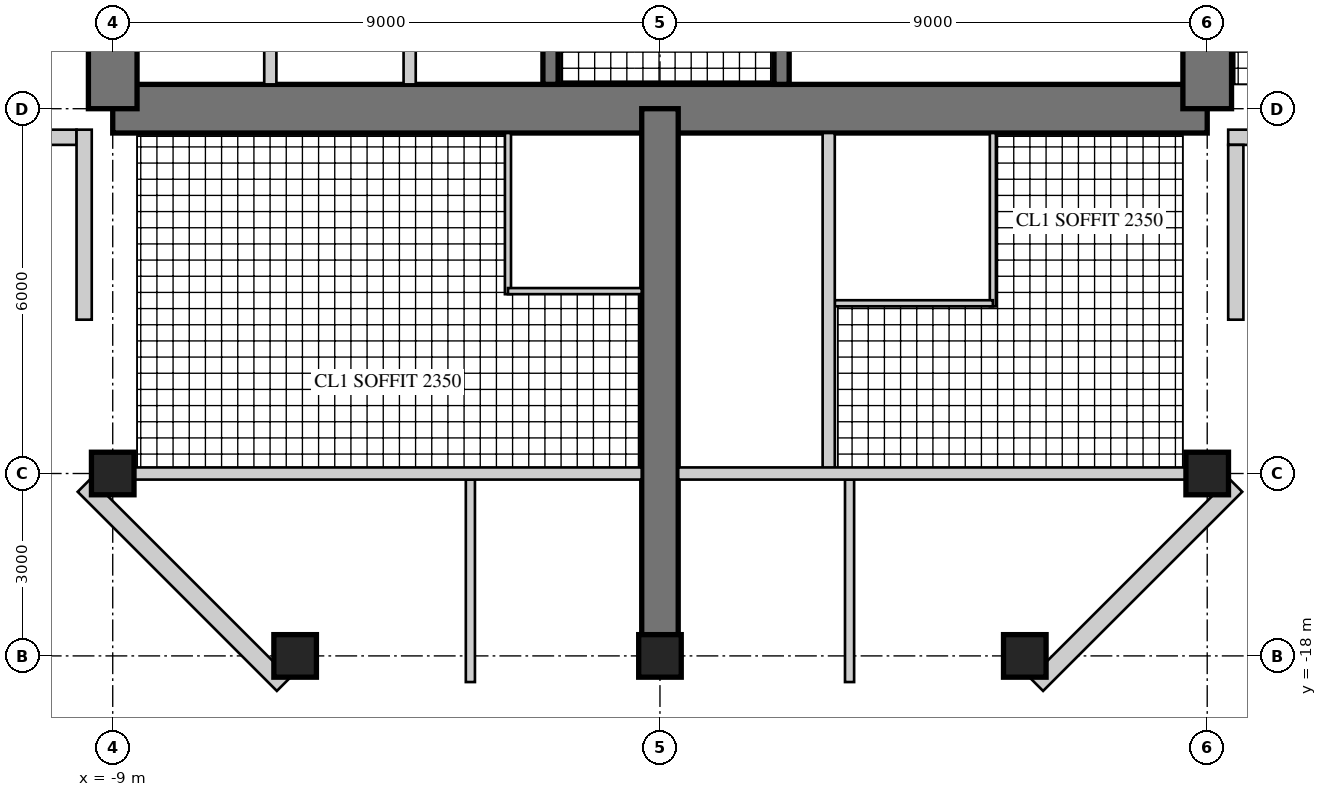
"""IFC4 building model, lengths in metres.
Left out: names, types, materials, properties, quantities, classifications, styles, units other than length and angle.
Written with IfcOpenShell. Run it as: python <this file> out.ifc"""

import sys

from ifc_helpers import new_model, si_unit, direction, frame, frame_2d, origin, origin_2d, place, context, subcontext, project, spatial, rectangle, hollow_rectangle, extrude, element, fill, save


model = new_model("IFC4")
c1 = context("Model", 3, precision=1e-05, world=origin(), true_north=direction((0.0, 1.0)))
c2 = subcontext(c1, "Body", "Model", "MODEL_VIEW")
j1 = project(units=[si_unit("LENGTHUNIT", "METRE"), si_unit("PLANEANGLEUNIT", "RADIAN")], contexts=[c1])
p1 = place(None, origin())
s1 = spatial("IfcSite", under=j1, at=p1, CompositionType="ELEMENT")
p2 = place(p1, origin())
s2 = spatial("IfcBuilding", under=s1, at=p2, CompositionType="ELEMENT")
p3 = place(p2, frame((0.0, 0.0, 278.1)))
s3 = spatial("IfcBuildingStorey", under=s2, at=p3, CompositionType="ELEMENT", Elevation=278.1)
p4 = place(p3, frame((-9.0, -9.0, 0.0), z_axis=(0.0, 0.0, 1.0), x_axis=(1.0, 0.0, 0.0)))
e1 = element("IfcWall", 1, at=p4, inside=s3, PredefinedType="SHEAR", context=c2, shape_type="SweptSolid", body=[
    extrude(rectangle(XDim=18.0, YDim=0.8, at=frame_2d((9.0, 0.0))), origin(), (0.0, 0.0, 1.0), 3.4),
])
p5 = place(p4, frame((9.8, 0.0, 0.0)))
e2 = element("IfcOpeningElement", 2, at=p5, cuts=e1, PredefinedType="OPENING", context=c2, shape_type="SweptSolid", body=[
    extrude(rectangle(XDim=1.0, YDim=2.4, at=frame_2d((0.5, 1.2))), frame((0.0, 0.41, 0.0), z_axis=(0.0, -1.0, 0.0), x_axis=(1.0, 0.0, 0.0)), (0.0, 0.0, 1.0), 0.82),
])
p6 = place(p3, frame((9.0, -9.0, 0.0), z_axis=(0.0, 0.0, 1.0), x_axis=(0.0, 1.0, 0.0)))
e3 = element("IfcWall", 3, at=p6, inside=s3, PredefinedType="SHEAR", context=c2, shape_type="SweptSolid", body=[
    extrude(rectangle(XDim=18.0, YDim=0.8, at=frame_2d((9.0, 0.0))), origin(), (0.0, 0.0, 1.0), 3.4),
])
p7 = place(p6, frame((9.8, 0.0, 0.0)))
e4 = element("IfcOpeningElement", 4, at=p7, cuts=e3, PredefinedType="OPENING", context=c2, shape_type="SweptSolid", body=[
    extrude(rectangle(XDim=1.0, YDim=2.4, at=frame_2d((0.5, 1.2))), frame((0.0, 0.41, 0.0), z_axis=(0.0, -1.0, 0.0), x_axis=(1.0, 0.0, 0.0)), (0.0, 0.0, 1.0), 0.82),
])
p8 = place(p3, frame((-9.0, 9.0, 0.0), z_axis=(0.0, 0.0, 1.0), x_axis=(0.0, -1.0, 0.0)))
e5 = element("IfcWall", 5, at=p8, inside=s3, PredefinedType="SHEAR", context=c2, shape_type="SweptSolid", body=[
    extrude(rectangle(XDim=18.0, YDim=0.8, at=frame_2d((9.0, 0.0))), origin(), (0.0, 0.0, 1.0), 3.4),
])
p9 = place(p8, frame((9.8, 0.0, 0.0)))
e6 = element("IfcOpeningElement", 6, at=p9, cuts=e5, PredefinedType="OPENING", context=c2, shape_type="SweptSolid", body=[
    extrude(rectangle(XDim=1.0, YDim=2.4, at=frame_2d((0.5, 1.2))), frame((0.0, 0.41, 0.0), z_axis=(0.0, -1.0, 0.0), x_axis=(1.0, 0.0, 0.0)), (0.0, 0.0, 1.0), 0.82),
])
p10 = place(p3, frame((-1.8, -1.875, 0.0), z_axis=(0.0, 0.0, 1.0), x_axis=(0.0, -1.0, 0.0)))
e7 = element("IfcWall", 7, at=p10, inside=s3, PredefinedType="SHEAR", context=c2, shape_type="SweptSolid", body=[
    extrude(rectangle(XDim=6.725, YDim=0.25, at=frame_2d((3.363, 0.0))), origin(), (0.0, 0.0, 1.0), 3.4),
])
p11 = place(p10, frame((1.875, 0.0, 0.0)))
e8 = element("IfcOpeningElement", 8, at=p11, cuts=e7, PredefinedType="OPENING", context=c2, shape_type="SweptSolid", body=[
    extrude(rectangle(XDim=1.6, YDim=2.4, at=frame_2d((0.8, 1.2))), frame((0.0, 0.135, 0.0), z_axis=(0.0, -1.0, 0.0), x_axis=(1.0, 0.0, 0.0)), (0.0, 0.0, 1.0), 0.27),
])
for number, where, z_axis, x_axis in (
    (9, (-4.117, -5.975, 0.0), (0.0, 0.0, 1.0), (0.0, -1.0, 0.0)),
    (10, (-6.408, -5.975, 0.0), (0.0, 0.0, 1.0), (0.0, -1.0, 0.0)),
):
    element("IfcWall", number, at=place(p3, frame(where, z_axis=z_axis, x_axis=x_axis)), inside=s3, PredefinedType="PARTITIONING", context=c2, shape_type="SweptSolid", body=[
        extrude(rectangle(XDim=2.625, YDim=0.2, at=frame_2d((1.312, 0.0))), origin(), (0.0, 0.0, 1.0), 3.4),
    ])
p12 = place(p3, frame((2.0, -1.675, 0.0), z_axis=(0.0, 0.0, 1.0), x_axis=(0.0, -1.0, 0.0)))
e11 = element("IfcWall", 11, at=p12, inside=s3, PredefinedType="SHEAR", context=c2, shape_type="SweptSolid", body=[
    extrude(rectangle(XDim=6.925, YDim=0.25, at=frame_2d((3.462, 0.0))), origin(), (0.0, 0.0, 1.0), 3.4),
])
p13 = place(p12, frame((0.725, 0.0, 0.0)))
e12 = element("IfcOpeningElement", 12, at=p13, cuts=e11, PredefinedType="OPENING", context=c2, shape_type="SweptSolid", body=[
    extrude(rectangle(XDim=1.0, YDim=2.1, at=frame_2d((0.5, 1.05))), frame((0.0, 0.135, 0.0), z_axis=(0.0, -1.0, 0.0), x_axis=(1.0, 0.0, 0.0)), (0.0, 0.0, 1.0), 0.27),
])
p14 = place(p3, frame((0.0, -9.0, 0.0), z_axis=(0.0, 0.0, 1.0), x_axis=(0.0, -1.0, 0.0)))
e13 = element("IfcWall", 13, at=p14, inside=s3, PredefinedType="SHEAR", context=c2, shape_type="SweptSolid", body=[
    extrude(rectangle(XDim=9.0, YDim=0.6, at=frame_2d((4.5, 0.0))), origin(), (0.0, 0.0, 1.0), 3.4),
])
p15 = place(p14, frame((3.8, 0.0, 0.0)))
e14 = element("IfcOpeningElement", 14, at=p15, cuts=e13, PredefinedType="OPENING", context=c2, shape_type="SweptSolid", body=[
    extrude(rectangle(XDim=1.0, YDim=2.15, at=frame_2d((0.5, 1.075))), frame((0.0, 0.31, 0.0), z_axis=(0.0, -1.0, 0.0), x_axis=(1.0, 0.0, 0.0)), (0.0, 0.0, 1.0), 0.62),
])
p16 = place(p14, frame((7.0, 0.0, 0.0)))
e15 = element("IfcOpeningElement", 15, at=p16, cuts=e13, PredefinedType="OPENING", context=c2, shape_type="SweptSolid", body=[
    extrude(rectangle(XDim=1.0, YDim=2.2, at=frame_2d((0.5, 1.1))), frame((0.0, 0.31, 0.0), z_axis=(0.0, -1.0, 0.0), x_axis=(1.0, 0.0, 0.0)), (0.0, 0.0, 1.0), 0.62),
])
for number, where, z_axis, x_axis in (
    (16, (-9.0, -15.0, 0.0), (0.0, 0.0, 1.0), (1.0, 0.0, 0.0)),
    (17, (9.0, -15.0, 0.0), (0.0, 0.0, 1.0), (1.0, 0.0, 0.0)),
    (18, (-6.0, -18.0, 0.0), (0.0, 0.0, 1.0), (1.0, 0.0, 0.0)),
    (19, (0.0, -18.0, 0.0), (0.0, 0.0, 1.0), (1.0, 0.0, 0.0)),
    (20, (6.0, -18.0, 0.0), (0.0, 0.0, 1.0), (1.0, 0.0, 0.0)),
):
    element("IfcColumn", number, at=place(p3, frame(where, z_axis=z_axis, x_axis=x_axis)), inside=s3, PredefinedType="COLUMN", context=c2, shape_type="SweptSolid", body=[
        extrude(rectangle(XDim=0.7, YDim=0.7, at=origin_2d()), origin(), (0.0, 0.0, 1.0), 3.4),
    ])
p17 = place(p3, frame((9.345, -9.47, 0.0), z_axis=(0.0, 0.0, 1.0), x_axis=(1.0, 0.0, 0.0)))
e21 = element("IfcWall", 21, at=p17, inside=s3, PredefinedType="SOLIDWALL", context=c2, shape_type="SweptSolid", body=[
    extrude(rectangle(XDim=3.125, YDim=0.25, at=frame_2d((1.562, 0.0))), origin(), (0.0, 0.0, 1.0), 3.22),
])
p18 = place(p17, frame((0.6, 0.0, 0.0)))
e22 = element("IfcOpeningElement", 22, at=p18, cuts=e21, PredefinedType="OPENING", context=c2, shape_type="SweptSolid", body=[
    extrude(rectangle(XDim=1.0, YDim=2.2, at=frame_2d((0.5, 1.1))), frame((0.0, 0.135, 0.0), z_axis=(0.0, -1.0, 0.0), x_axis=(1.0, 0.0, 0.0)), (0.0, 0.0, 1.0), 0.27),
])
p19 = place(p3, frame((-12.47, -9.47, 0.0), z_axis=(0.0, 0.0, 1.0), x_axis=(1.0, 0.0, 0.0)))
e23 = element("IfcWall", 23, at=p19, inside=s3, PredefinedType="SOLIDWALL", context=c2, shape_type="SweptSolid", body=[
    extrude(rectangle(XDim=2.875, YDim=0.25, at=frame_2d((1.438, 0.0))), origin(), (0.0, 0.0, 1.0), 3.22),
])
p20 = place(p19, frame((0.6, 0.0, 0.0)))
e24 = element("IfcOpeningElement", 24, at=p20, cuts=e23, PredefinedType="OPENING", context=c2, shape_type="SweptSolid", body=[
    extrude(rectangle(XDim=1.0, YDim=2.2, at=frame_2d((0.5, 1.1))), frame((0.0, 0.135, 0.0), z_axis=(0.0, -1.0, 0.0), x_axis=(1.0, 0.0, 0.0)), (0.0, 0.0, 1.0), 0.27),
])
p21 = place(p3, frame((-9.47, -9.345, 0.0), z_axis=(0.0, 0.0, 1.0), x_axis=(0.0, -1.0, 0.0)))
e25 = element("IfcWall", 25, at=p21, inside=s3, PredefinedType="SOLIDWALL", context=c2, shape_type="SweptSolid", body=[
    extrude(rectangle(XDim=3.125, YDim=0.25, at=frame_2d((1.562, 0.0))), origin(), (0.0, 0.0, 1.0), 3.22),
])
p22 = place(p21, frame((0.6, 0.0, 0.0)))
e26 = element("IfcOpeningElement", 26, at=p22, cuts=e25, PredefinedType="OPENING", context=c2, shape_type="SweptSolid", body=[
    extrude(rectangle(XDim=1.0, YDim=2.2, at=frame_2d((0.5, 1.1))), frame((0.0, 0.135, 0.0), z_axis=(0.0, -1.0, 0.0), x_axis=(1.0, 0.0, 0.0)), (0.0, 0.0, 1.0), 0.27),
])
p23 = place(p3, frame((-9.47, -15.195, 0.0), z_axis=(0.0, 0.0, 1.0), x_axis=(0.707106781187, -0.707106781187, 0.0)))
e27 = element("IfcWall", 27, at=p23, inside=s3, PredefinedType="SOLIDWALL", context=c2, shape_type="SweptSolid", body=[
    extrude(rectangle(XDim=4.632, YDim=0.3, at=frame_2d((2.316, 0.0))), origin(), (0.0, 0.0, 1.0), 3.22),
])
p24 = place(p23, frame((1.866, 0.0, 0.3)))
e28 = element("IfcOpeningElement", 28, at=p24, cuts=e27, PredefinedType="OPENING", context=c2, shape_type="SweptSolid", body=[
    extrude(rectangle(XDim=0.9, YDim=2.4, at=frame_2d((0.45, 1.2))), frame((0.0, 0.16, 0.0), z_axis=(0.0, -1.0, 0.0), x_axis=(1.0, 0.0, 0.0)), (0.0, 0.0, 1.0), 0.32),
])
p25 = place(p3, frame((6.195, -18.47, 0.0), z_axis=(0.0, 0.0, 1.0), x_axis=(0.707106781187, 0.707106781187, 0.0)))
e29 = element("IfcWall", 29, at=p25, inside=s3, PredefinedType="SOLIDWALL", context=c2, shape_type="SweptSolid", body=[
    extrude(rectangle(XDim=4.632, YDim=0.3, at=frame_2d((2.316, 0.0))), origin(), (0.0, 0.0, 1.0), 3.22),
])
p26 = place(p25, frame((1.866, 0.0, 0.3)))
e30 = element("IfcOpeningElement", 30, at=p26, cuts=e29, PredefinedType="OPENING", context=c2, shape_type="SweptSolid", body=[
    extrude(rectangle(XDim=0.9, YDim=2.4, at=frame_2d((0.45, 1.2))), frame((0.0, 0.16, 0.0), z_axis=(0.0, -1.0, 0.0), x_axis=(1.0, 0.0, 0.0)), (0.0, 0.0, 1.0), 0.32),
])
p27 = place(p3, frame((9.47, -12.47, 0.0), z_axis=(0.0, 0.0, 1.0), x_axis=(0.0, 1.0, 0.0)))
e31 = element("IfcWall", 31, at=p27, inside=s3, PredefinedType="SOLIDWALL", context=c2, shape_type="SweptSolid", body=[
    extrude(rectangle(XDim=2.875, YDim=0.25, at=frame_2d((1.438, 0.0))), origin(), (0.0, 0.0, 1.0), 3.22),
])
p28 = place(p27, frame((0.6, 0.0, 0.0)))
e32 = element("IfcOpeningElement", 32, at=p28, cuts=e31, PredefinedType="OPENING", context=c2, shape_type="SweptSolid", body=[
    extrude(rectangle(XDim=1.0, YDim=2.2, at=frame_2d((0.5, 1.1))), frame((0.0, 0.135, 0.0), z_axis=(0.0, -1.0, 0.0), x_axis=(1.0, 0.0, 0.0)), (0.0, 0.0, 1.0), 0.27),
])
p29 = place(p3, frame((5.475, -9.4, 0.0), z_axis=(0.0, 0.0, 1.0), x_axis=(0.0, -1.0, 0.0)))
e33 = element("IfcWall", 33, at=p29, inside=s3, PredefinedType="PARTITIONING", context=c2, shape_type="SweptSolid", body=[
    extrude(rectangle(XDim=2.85, YDim=0.1, at=frame_2d((1.425, 0.0))), origin(), (0.0, 0.0, 1.0), 3.22),
])
p30 = place(p3, frame((2.875, -12.2, 0.0), z_axis=(0.0, 0.0, 1.0), x_axis=(1.0, 0.0, 0.0)))
e34 = element("IfcWall", 34, at=p30, inside=s3, PredefinedType="PARTITIONING", context=c2, shape_type="SweptSolid", body=[
    extrude(rectangle(XDim=2.6, YDim=0.1, at=frame_2d((1.3, 0.0))), origin(), (0.0, 0.0, 1.0), 3.22),
])
p31 = place(p30, frame((0.55, 0.0, 0.0)))
e35 = element("IfcOpeningElement", 35, at=p31, cuts=e34, PredefinedType="OPENING", context=c2, shape_type="SweptSolid", body=[
    extrude(rectangle(XDim=0.9, YDim=2.1, at=frame_2d((0.45, 1.05))), frame((0.0, 0.06, 0.0), z_axis=(0.0, -1.0, 0.0), x_axis=(1.0, 0.0, 0.0)), (0.0, 0.0, 1.0), 0.12),
])
p32 = place(p3, frame((-2.5, -9.4, 0.0), z_axis=(0.0, 0.0, 1.0), x_axis=(0.0, -1.0, 0.0)))
e36 = element("IfcWall", 36, at=p32, inside=s3, PredefinedType="PARTITIONING", context=c2, shape_type="SweptSolid", body=[
    extrude(rectangle(XDim=2.65, YDim=0.1, at=frame_2d((1.325, 0.0))), origin(), (0.0, 0.0, 1.0), 3.22),
])
p33 = place(p3, frame((-2.5, -12.0, 0.0), z_axis=(0.0, 0.0, 1.0), x_axis=(1.0, 0.0, 0.0)))
e37 = element("IfcWall", 37, at=p33, inside=s3, PredefinedType="PARTITIONING", context=c2, shape_type="SweptSolid", body=[
    extrude(rectangle(XDim=2.2, YDim=0.1, at=frame_2d((1.1, 0.0))), origin(), (0.0, 0.0, 1.0), 3.22),
])
p34 = place(p33, frame((0.55, 0.0, 0.0)))
e38 = element("IfcOpeningElement", 38, at=p34, cuts=e37, PredefinedType="OPENING", context=c2, shape_type="SweptSolid", body=[
    extrude(rectangle(XDim=0.9, YDim=2.1, at=frame_2d((0.45, 1.05))), frame((0.0, 0.06, 0.0), z_axis=(0.0, -1.0, 0.0), x_axis=(1.0, 0.0, 0.0)), (0.0, 0.0, 1.0), 0.12),
])
p35 = place(p3, frame((2.775, -9.4, 0.0), z_axis=(0.0, 0.0, 1.0), x_axis=(0.0, -1.0, 0.0)))
e39 = element("IfcWall", 39, at=p35, inside=s3, PredefinedType="SOLIDWALL", context=c2, shape_type="SweptSolid", body=[
    extrude(rectangle(XDim=5.6, YDim=0.2, at=frame_2d((2.8, 0.0))), origin(), (0.0, 0.0, 1.0), 3.22),
])
p36 = place(p35, frame((3.4, 0.0, 0.0)))
e40 = element("IfcOpeningElement", 40, at=p36, cuts=e39, PredefinedType="OPENING", context=c2, shape_type="SweptSolid", body=[
    extrude(rectangle(XDim=1.0, YDim=2.15, at=frame_2d((0.5, 1.075))), frame((0.0, 0.11, 0.0), z_axis=(0.0, -1.0, 0.0), x_axis=(1.0, 0.0, 0.0)), (0.0, 0.0, 1.0), 0.22),
])
p37 = place(p3, frame((3.118, -15.1, 0.0), z_axis=(0.0, 0.0, 1.0), x_axis=(0.0, -1.0, 0.0)))
e41 = element("IfcWall", 41, at=p37, inside=s3, PredefinedType="PARTITIONING", context=c2, shape_type="SweptSolid", body=[
    extrude(rectangle(XDim=3.33, YDim=0.15, at=frame_2d((1.665, 0.0))), origin(), (0.0, 0.0, 1.0), 3.22),
])
p38 = place(p37, frame((0.6, 0.0, 0.0)))
e42 = element("IfcOpeningElement", 42, at=p38, cuts=e41, PredefinedType="OPENING", context=c2, shape_type="SweptSolid", body=[
    extrude(rectangle(XDim=1.0, YDim=2.1, at=frame_2d((0.5, 1.05))), frame((0.0, 0.085, 0.0), z_axis=(0.0, -1.0, 0.0), x_axis=(1.0, 0.0, 0.0)), (0.0, 0.0, 1.0), 0.17),
])
p39 = place(p3, frame((-3.118, -15.1, 0.0), z_axis=(0.0, 0.0, 1.0), x_axis=(0.0, -1.0, 0.0)))
e43 = element("IfcWall", 43, at=p39, inside=s3, PredefinedType="PARTITIONING", context=c2, shape_type="SweptSolid", body=[
    extrude(rectangle(XDim=3.33, YDim=0.15, at=frame_2d((1.665, 0.0))), origin(), (0.0, 0.0, 1.0), 3.22),
])
p40 = place(p39, frame((0.6, 0.0, 0.0)))
e44 = element("IfcOpeningElement", 44, at=p40, cuts=e43, PredefinedType="OPENING", context=c2, shape_type="SweptSolid", body=[
    extrude(rectangle(XDim=1.0, YDim=2.1, at=frame_2d((0.5, 1.05))), frame((0.0, 0.085, 0.0), z_axis=(0.0, -1.0, 0.0), x_axis=(1.0, 0.0, 0.0)), (0.0, 0.0, 1.0), 0.17),
])
p41 = place(p3, frame((-8.65, -15.0, 0.0), z_axis=(0.0, 0.0, 1.0), x_axis=(1.0, 0.0, 0.0)))
e45 = element("IfcWall", 45, at=p41, inside=s3, PredefinedType="SOLIDWALL", context=c2, shape_type="SweptSolid", body=[
    extrude(rectangle(XDim=8.35, YDim=0.2, at=frame_2d((4.175, 0.0))), origin(), (0.0, 0.0, 1.0), 2.52),
])
p42 = place(p3, frame((0.3, -15.0, 0.0), z_axis=(0.0, 0.0, 1.0), x_axis=(1.0, 0.0, 0.0)))
e46 = element("IfcWall", 46, at=p42, inside=s3, PredefinedType="SOLIDWALL", context=c2, shape_type="SweptSolid", body=[
    extrude(rectangle(XDim=8.35, YDim=0.2, at=frame_2d((4.175, 0.0))), origin(), (0.0, 0.0, 1.0), 2.52),
])
p43 = place(p42, frame((0.4, 0.0, 0.0)))
e47 = element("IfcOpeningElement", 47, at=p43, cuts=e46, PredefinedType="OPENING", context=c2, shape_type="SweptSolid", body=[
    extrude(rectangle(XDim=1.0, YDim=2.2, at=frame_2d((0.5, 1.1))), frame((0.0, 0.11, 0.0), z_axis=(0.0, -1.0, 0.0), x_axis=(1.0, 0.0, 0.0)), (0.0, 0.0, 1.0), 0.22),
])
p44 = place(p22, origin())
e48 = element("IfcDoor", 48, at=p44, inside=s3, OperationType="SINGLE_SWING_LEFT", PredefinedType="DOOR", context=c2, shape_type="SweptSolid", body=[
    extrude(hollow_rectangle(XDim=1.0, YDim=2.2, WallThickness=0.06, at=frame_2d((0.5, 1.1))), frame((0.0, 0.025, 0.0), z_axis=(0.0, -1.0, 0.0), x_axis=(1.0, 0.0, 0.0)), (0.0, 0.0, 1.0), 0.05),
    extrude(rectangle(XDim=0.879, YDim=2.079, at=frame_2d((0.5, 1.1))), frame((0.0, 0.025, 0.0), z_axis=(0.0, -1.0, 0.0), x_axis=(1.0, 0.0, 0.0)), (0.0, 0.0, 1.0), 0.05),
])
fill(e26, e48)
p45 = place(p24, origin())
e49 = element("IfcWindow", 49, at=p45, inside=s3, PartitioningType="SINGLE_PANEL", PredefinedType="WINDOW", context=c2, shape_type="SweptSolid", body=[
    extrude(hollow_rectangle(XDim=0.9, YDim=2.4, WallThickness=0.06, at=frame_2d((0.45, 1.2))), frame((0.0, 0.03, 0.0), z_axis=(0.0, -1.0, 0.0), x_axis=(1.0, 0.0, 0.0)), (0.0, 0.0, 1.0), 0.06),
    extrude(rectangle(XDim=0.779, YDim=2.279, at=frame_2d((0.45, 1.2))), frame((0.0, 0.03, 0.0), z_axis=(0.0, -1.0, 0.0), x_axis=(1.0, 0.0, 0.0)), (0.0, 0.0, 1.0), 0.06),
])
fill(e28, e49)
p46 = place(p26, origin())
e50 = element("IfcWindow", 50, at=p46, inside=s3, PartitioningType="SINGLE_PANEL", PredefinedType="WINDOW", context=c2, shape_type="SweptSolid", body=[
    extrude(hollow_rectangle(XDim=0.9, YDim=2.4, WallThickness=0.06, at=frame_2d((0.45, 1.2))), frame((0.0, 0.03, 0.0), z_axis=(0.0, -1.0, 0.0), x_axis=(1.0, 0.0, 0.0)), (0.0, 0.0, 1.0), 0.06),
    extrude(rectangle(XDim=0.779, YDim=2.279, at=frame_2d((0.45, 1.2))), frame((0.0, 0.03, 0.0), z_axis=(0.0, -1.0, 0.0), x_axis=(1.0, 0.0, 0.0)), (0.0, 0.0, 1.0), 0.06),
])
fill(e30, e50)
p47 = place(p28, origin())
e51 = element("IfcDoor", 51, at=p47, inside=s3, OperationType="SINGLE_SWING_RIGHT", PredefinedType="DOOR", context=c2, shape_type="SweptSolid", body=[
    extrude(hollow_rectangle(XDim=1.0, YDim=2.2, WallThickness=0.06, at=frame_2d((0.5, 1.1))), frame((0.0, 0.025, 0.0), z_axis=(0.0, -1.0, 0.0), x_axis=(1.0, 0.0, 0.0)), (0.0, 0.0, 1.0), 0.05),
    extrude(rectangle(XDim=0.879, YDim=2.079, at=frame_2d((0.5, 1.1))), frame((0.0, 0.025, 0.0), z_axis=(0.0, -1.0, 0.0), x_axis=(1.0, 0.0, 0.0)), (0.0, 0.0, 1.0), 0.05),
])
fill(e32, e51)
p48 = place(p31, origin())
e52 = element("IfcDoor", 52, at=p48, inside=s3, OperationType="SINGLE_SWING_LEFT", PredefinedType="DOOR", context=c2, shape_type="SweptSolid", body=[
    extrude(rectangle(XDim=0.9, YDim=2.1, at=frame_2d((0.45, 1.05))), frame((0.0, 0.025, 0.0), z_axis=(0.0, -1.0, 0.0), x_axis=(1.0, 0.0, 0.0)), (0.0, 0.0, 1.0), 0.05),
])
fill(e35, e52)
p49 = place(p34, origin())
e53 = element("IfcDoor", 53, at=p49, inside=s3, OperationType="SINGLE_SWING_LEFT", PredefinedType="DOOR", context=c2, shape_type="SweptSolid", body=[
    extrude(rectangle(XDim=0.9, YDim=2.1, at=frame_2d((0.45, 1.05))), frame((0.0, 0.025, 0.0), z_axis=(0.0, -1.0, 0.0), x_axis=(1.0, 0.0, 0.0)), (0.0, 0.0, 1.0), 0.05),
])
fill(e38, e53)
p50 = place(p36, origin())
e54 = element("IfcDoor", 54, at=p50, inside=s3, OperationType="SINGLE_SWING_LEFT", PredefinedType="DOOR", context=c2, shape_type="SweptSolid", body=[
    extrude(rectangle(XDim=1.0, YDim=2.15, at=frame_2d((0.5, 1.075))), frame((0.0, 0.025, 0.0), z_axis=(0.0, -1.0, 0.0), x_axis=(1.0, 0.0, 0.0)), (0.0, 0.0, 1.0), 0.05),
])
fill(e40, e54)
p51 = place(p38, frame((1.0, 0.0, 0.0), z_axis=(0.0, 0.0, 1.0), x_axis=(-1.0, 0.0, 0.0)))
e55 = element("IfcDoor", 55, at=p51, inside=s3, OperationType="SINGLE_SWING_RIGHT", PredefinedType="DOOR", context=c2, shape_type="SweptSolid", body=[
    extrude(rectangle(XDim=1.0, YDim=2.1, at=frame_2d((0.5, 1.05))), frame((0.0, 0.025, 0.0), z_axis=(0.0, -1.0, 0.0), x_axis=(1.0, 0.0, 0.0)), (0.0, 0.0, 1.0), 0.05),
])
fill(e42, e55)
p52 = place(p40, origin())
e56 = element("IfcDoor", 56, at=p52, inside=s3, OperationType="SINGLE_SWING_LEFT", PredefinedType="DOOR", context=c2, shape_type="SweptSolid", body=[
    extrude(rectangle(XDim=1.0, YDim=2.1, at=frame_2d((0.5, 1.05))), frame((0.0, 0.025, 0.0), z_axis=(0.0, -1.0, 0.0), x_axis=(1.0, 0.0, 0.0)), (0.0, 0.0, 1.0), 0.05),
])
fill(e44, e56)
p53 = place(p43, frame((1.0, 0.0, 0.0), z_axis=(0.0, 0.0, 1.0), x_axis=(-1.0, 0.0, 0.0)))
e57 = element("IfcDoor", 57, at=p53, inside=s3, OperationType="SINGLE_SWING_LEFT", PredefinedType="DOOR", context=c2, shape_type="SweptSolid", body=[
    extrude(rectangle(XDim=1.0, YDim=2.2, at=frame_2d((0.5, 1.1))), frame((0.0, 0.025, 0.0), z_axis=(0.0, -1.0, 0.0), x_axis=(1.0, 0.0, 0.0)), (0.0, 0.0, 1.0), 0.05),
])
fill(e47, e57)
p54 = place(p15, frame((1.0, 0.0, 0.0), z_axis=(0.0, 0.0, 1.0), x_axis=(-1.0, 0.0, 0.0)))
e58 = element("IfcDoor", 58, at=p54, inside=s3, OperationType="SINGLE_SWING_RIGHT", PredefinedType="DOOR", context=c2, shape_type="SweptSolid", body=[
    extrude(rectangle(XDim=1.0, YDim=2.15, at=frame_2d((0.5, 1.075))), frame((0.0, 0.025, 0.0), z_axis=(0.0, -1.0, 0.0), x_axis=(1.0, 0.0, 0.0)), (0.0, 0.0, 1.0), 0.05),
])
fill(e14, e58)
p55 = place(p16, origin())
e59 = element("IfcDoor", 59, at=p55, inside=s3, OperationType="SINGLE_SWING_LEFT", PredefinedType="DOOR", context=c2, shape_type="SweptSolid", body=[
    extrude(rectangle(XDim=1.0, YDim=2.2, at=frame_2d((0.5, 1.1))), frame((0.0, 0.025, 0.0), z_axis=(0.0, -1.0, 0.0), x_axis=(1.0, 0.0, 0.0)), (0.0, 0.0, 1.0), 0.05),
])
fill(e15, e59)
p56 = place(p5, origin())
e60 = element("IfcDoor", 60, at=p56, inside=s3, OperationType="SINGLE_SWING_RIGHT", PredefinedType="DOOR", context=c2, shape_type="SweptSolid", body=[
    extrude(rectangle(XDim=1.0, YDim=2.4, at=frame_2d((0.5, 1.2))), frame((0.0, 0.055, 0.0), z_axis=(0.0, -1.0, 0.0), x_axis=(1.0, 0.0, 0.0)), (0.0, 0.0, 1.0), 0.05),
])
fill(e2, e60)
save(model, sys.argv[1])
